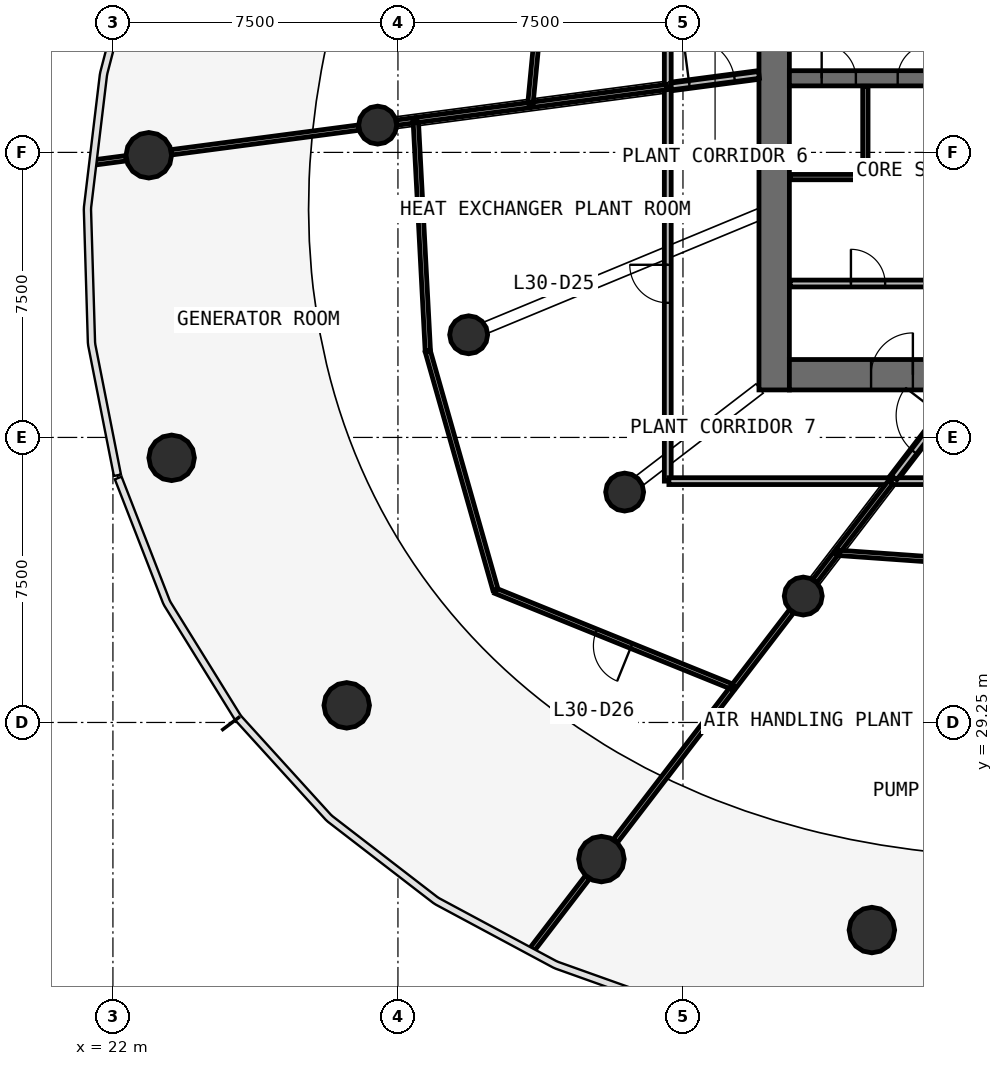
"""IFC4 building model, lengths in metres.
Left out: names, types, materials, properties, quantities, classifications, styles, units other than length and angle.
Written with IfcOpenShell. Run it as: python <this file> out.ifc"""

import sys

from ifc_helpers import new_model, si_unit, direction, frame, frame_2d, origin, origin_2d, place, context, subcontext, project, spatial, rectangle, circle, extrude, source, transform, mapped, element, fill, save


model = new_model("IFC4")
c1 = context("Model", 3, precision=1e-05, world=origin(), true_north=direction((0.0, 1.0)))
c2 = subcontext(c1, "Body", "Model", "MODEL_VIEW")
j1 = project(units=[si_unit("LENGTHUNIT", "METRE"), si_unit("PLANEANGLEUNIT", "RADIAN")], contexts=[c1])
p1 = place(None, origin())
s1 = spatial("IfcSite", under=j1, at=p1, CompositionType="ELEMENT")
p2 = place(p1, origin())
s2 = spatial("IfcBuilding", under=s1, at=p2, CompositionType="ELEMENT")
p3 = place(p2, frame((0.0, 0.0, 129.0)))
s3 = spatial("IfcBuildingStorey", under=s2, at=p3, CompositionType="ELEMENT", Elevation=129.0)
p4 = place(p3, frame((39.4, 58.0, 0.0), z_axis=(0.0, 0.0, 1.0), x_axis=(0.0, -1.0, 0.0)))
e1 = element("IfcWall", 1, at=p4, inside=s3, PredefinedType="SHEAR", context=c2, shape_type="SweptSolid", body=[
    extrude(rectangle(XDim=20.0, YDim=0.8, at=frame_2d((10.0, 0.0))), origin(), (0.0, 0.0, 1.0), 4.1),
])
p5 = place(p4, frame((9.1, 0.0, 0.0)))
e2 = element("IfcOpeningElement", 2, at=p5, cuts=e1, PredefinedType="OPENING", context=c2, shape_type="SweptSolid", body=[
    extrude(rectangle(XDim=1.8, YDim=2.1, at=frame_2d((0.9, 1.05))), frame((0.0, 0.41, 0.0), z_axis=(0.0, -1.0, 0.0), x_axis=(1.0, 0.0, 0.0)), (0.0, 0.0, 1.0), 0.82),
])
p6 = place(p3, frame((39.8, 38.4, 0.0), z_axis=(0.0, 0.0, 1.0), x_axis=(1.0, 0.0, 0.0)))
e3 = element("IfcWall", 3, at=p6, inside=s3, PredefinedType="SHEAR", context=c2, shape_type="SweptSolid", body=[
    extrude(rectangle(XDim=24.4, YDim=0.8, at=frame_2d((12.2, 0.0))), origin(), (0.0, 0.0, 1.0), 4.1),
])
p7 = place(p6, frame((21.65, 0.0, 0.0)))
e4 = element("IfcOpeningElement", 4, at=p7, cuts=e3, PredefinedType="OPENING", context=c2, shape_type="SweptSolid", body=[
    extrude(rectangle(XDim=1.1, YDim=2.1, at=frame_2d((0.55, 1.05))), frame((0.0, 0.41, 0.0), z_axis=(0.0, -1.0, 0.0), x_axis=(1.0, 0.0, 0.0)), (0.0, 0.0, 1.0), 0.82),
])
p8 = place(p6, frame((2.15, 0.0, 0.0)))
e5 = element("IfcOpeningElement", 5, at=p8, cuts=e3, PredefinedType="OPENING", context=c2, shape_type="SweptSolid", body=[
    extrude(rectangle(XDim=1.1, YDim=2.1, at=frame_2d((0.55, 1.05))), frame((0.0, 0.41, 0.0), z_axis=(0.0, -1.0, 0.0), x_axis=(1.0, 0.0, 0.0)), (0.0, 0.0, 1.0), 0.82),
])
p9 = place(p3, frame((39.8, 46.2, 0.0), z_axis=(0.0, 0.0, 1.0), x_axis=(1.0, 0.0, 0.0)))
e6 = element("IfcWall", 6, at=p9, inside=s3, PredefinedType="SHEAR", context=c2, shape_type="SweptSolid", body=[
    extrude(rectangle(XDim=24.4, YDim=0.4, at=frame_2d((12.2, 0.0))), origin(), (0.0, 0.0, 1.0), 4.1),
])
p10 = place(p9, frame((20.65, 0.0, 0.0)))
e7 = element("IfcOpeningElement", 7, at=p10, cuts=e6, PredefinedType="OPENING", context=c2, shape_type="SweptSolid", body=[
    extrude(rectangle(XDim=0.9, YDim=2.1, at=frame_2d((0.45, 1.05))), frame((0.0, 0.21, 0.0), z_axis=(0.0, -1.0, 0.0), x_axis=(1.0, 0.0, 0.0)), (0.0, 0.0, 1.0), 0.42),
])
p11 = place(p9, frame((22.65, 0.0, 0.0)))
e8 = element("IfcOpeningElement", 8, at=p11, cuts=e6, PredefinedType="OPENING", context=c2, shape_type="SweptSolid", body=[
    extrude(rectangle(XDim=0.9, YDim=2.1, at=frame_2d((0.45, 1.05))), frame((0.0, 0.21, 0.0), z_axis=(0.0, -1.0, 0.0), x_axis=(1.0, 0.0, 0.0)), (0.0, 0.0, 1.0), 0.42),
])
p12 = place(p9, frame((0.85, 0.0, 0.0)))
e9 = element("IfcOpeningElement", 9, at=p12, cuts=e6, PredefinedType="OPENING", context=c2, shape_type="SweptSolid", body=[
    extrude(rectangle(XDim=0.9, YDim=2.1, at=frame_2d((0.45, 1.05))), frame((0.0, 0.21, 0.0), z_axis=(0.0, -1.0, 0.0), x_axis=(1.0, 0.0, 0.0)), (0.0, 0.0, 1.0), 0.42),
])
p13 = place(p9, frame((2.85, 0.0, 0.0)))
e10 = element("IfcOpeningElement", 10, at=p13, cuts=e6, PredefinedType="OPENING", context=c2, shape_type="SweptSolid", body=[
    extrude(rectangle(XDim=0.9, YDim=2.1, at=frame_2d((0.45, 1.05))), frame((0.0, 0.21, 0.0), z_axis=(0.0, -1.0, 0.0), x_axis=(1.0, 0.0, 0.0)), (0.0, 0.0, 1.0), 0.42),
])
p14 = place(p9, frame((11.85, 0.0, 0.0)))
e11 = element("IfcOpeningElement", 11, at=p14, cuts=e6, PredefinedType="OPENING", context=c2, shape_type="SweptSolid", body=[
    extrude(rectangle(XDim=0.9, YDim=2.1, at=frame_2d((0.45, 1.05))), frame((0.0, 0.21, 0.0), z_axis=(0.0, -1.0, 0.0), x_axis=(1.0, 0.0, 0.0)), (0.0, 0.0, 1.0), 0.42),
])
m1 = source(origin(), c2, "Body", "SweptSolid", [
    extrude(circle(Radius=0.6, at=origin_2d()), origin(), (0.0, 0.0, 1.0), 3.78),
])
for number, where, z_axis, x_axis in (
    (12, (22.944, 44.175, 0.0), (0.0, 0.0, 1.0), (1.0, 0.0, 0.0)),
    (13, (23.544, 36.213, 0.0), (0.0, 0.0, 1.0), (1.0, 0.0, 0.0)),
    (14, (28.152, 29.701, 0.0), (0.0, 0.0, 1.0), (1.0, 0.0, 0.0)),
    (15, (34.854, 25.655, 0.0), (0.0, 0.0, 1.0), (1.0, 0.0, 0.0)),
    (16, (41.971, 23.788, 0.0), (0.0, 0.0, 1.0), (1.0, 0.0, 0.0)),
):
    element("IfcColumn", number, at=place(p3, frame(where, z_axis=z_axis, x_axis=x_axis)), inside=s3, PredefinedType="COLUMN", context=c2, shape_type="MappedRepresentation", body=[
        mapped(m1, transform((0.0, 0.0, 0.0), scale=1.0)),
    ])
m2 = source(origin(), c2, "Body", "SweptSolid", [
    extrude(circle(Radius=0.5, at=origin_2d()), origin(), (0.0, 0.0, 1.0), 3.78),
])
for number, where, z_axis, x_axis in (
    (17, (28.966, 44.968, 0.0), (0.0, 0.0, 1.0), (1.0, 0.0, 0.0)),
    (18, (31.361, 39.451, 0.0), (0.0, 0.0, 1.0), (1.0, 0.0, 0.0)),
    (19, (35.465, 35.312, 0.0), (0.0, 0.0, 1.0), (1.0, 0.0, 0.0)),
    (20, (40.165, 32.576, 0.0), (0.0, 0.0, 1.0), (1.0, 0.0, 0.0)),
):
    element("IfcColumn", number, at=place(p3, frame(where, z_axis=z_axis, x_axis=x_axis)), inside=s3, PredefinedType="COLUMN", context=c2, shape_type="MappedRepresentation", body=[
        mapped(m2, transform((0.0, 0.0, 0.0), scale=1.0)),
    ])
p15 = place(p3, frame((36.6, 45.973, 0.0), z_axis=(0.0, 0.0, 1.0), x_axis=(0.0, 1.0, 0.0)))
e21 = element("IfcWall", 21, at=p15, inside=s3, PredefinedType="PARTITIONING", context=c2, shape_type="SweptSolid", body=[
    extrude(rectangle(XDim=13.24, YDim=0.18, at=frame_2d((6.62, 0.0))), origin(), (0.0, 0.0, 1.0), 2.58),
])
p16 = place(p15, frame((6.19, 0.0, 0.0)))
e22 = element("IfcOpeningElement", 22, at=p16, cuts=e21, PredefinedType="OPENING", context=c2, shape_type="SweptSolid", body=[
    extrude(rectangle(XDim=1.0, YDim=2.1, at=frame_2d((0.5, 1.05))), frame((0.0, 0.1, 0.0), z_axis=(0.0, -1.0, 0.0), x_axis=(1.0, 0.0, 0.0)), (0.0, 0.0, 1.0), 0.2),
])
p17 = place(p3, frame((53.603, 35.6, 0.0), z_axis=(0.0, 0.0, 1.0), x_axis=(-1.0, 0.0, 0.0)))
e23 = element("IfcWall", 23, at=p17, inside=s3, PredefinedType="PARTITIONING", context=c2, shape_type="SweptSolid", body=[
    extrude(rectangle(XDim=11.117, YDim=0.18, at=frame_2d((5.559, 0.0))), origin(), (0.0, 0.0, 1.0), 2.58),
])
p18 = place(p17, frame((5.067, 0.0, 0.0)))
e24 = element("IfcOpeningElement", 24, at=p18, cuts=e23, PredefinedType="OPENING", context=c2, shape_type="SweptSolid", body=[
    extrude(rectangle(XDim=1.0, YDim=2.1, at=frame_2d((0.5, 1.05))), frame((0.0, 0.1, 0.0), z_axis=(0.0, -1.0, 0.0), x_axis=(1.0, 0.0, 0.0)), (0.0, 0.0, 1.0), 0.2),
])
p19 = place(p3, frame((36.6, 35.6, 0.0), z_axis=(0.0, 0.0, 1.0), x_axis=(0.0, 1.0, 0.0)))
e25 = element("IfcWall", 25, at=p19, inside=s3, PredefinedType="PARTITIONING", context=c2, shape_type="SweptSolid", body=[
    extrude(rectangle(XDim=10.343, YDim=0.18, at=frame_2d((5.171, 0.0))), origin(), (0.0, 0.0, 1.0), 2.58),
])
p20 = place(p19, frame((4.693, 0.0, 0.0)))
e26 = element("IfcOpeningElement", 26, at=p20, cuts=e25, PredefinedType="OPENING", context=c2, shape_type="SweptSolid", body=[
    extrude(rectangle(XDim=1.0, YDim=2.1, at=frame_2d((0.5, 1.05))), frame((0.0, 0.1, 0.0), z_axis=(0.0, -1.0, 0.0), x_axis=(1.0, 0.0, 0.0)), (0.0, 0.0, 1.0), 0.2),
])
p21 = place(p3, frame((36.63, 35.6, 0.0), z_axis=(0.0, 0.0, 1.0), x_axis=(1.0, 0.0, 0.0)))
e27 = element("IfcWall", 27, at=p21, inside=s3, PredefinedType="PARTITIONING", context=c2, shape_type="SweptSolid", body=[
    extrude(rectangle(XDim=5.825, YDim=0.18, at=frame_2d((2.913, 0.0))), origin(), (0.0, 0.0, 1.0), 2.58),
])
p22 = place(p3, frame((39.82, 40.8, 0.0), z_axis=(0.0, 0.0, 1.0), x_axis=(1.0, 0.0, 0.0)))
e28 = element("IfcWall", 28, at=p22, inside=s3, PredefinedType="PARTITIONING", context=c2, shape_type="SweptSolid", body=[
    extrude(rectangle(XDim=3.95, YDim=0.18, at=frame_2d((1.975, 0.0))), origin(), (0.0, 0.0, 1.0), 3.78),
])
p23 = place(p22, frame((1.6, 0.0, 0.0)))
e29 = element("IfcOpeningElement", 29, at=p23, cuts=e28, PredefinedType="OPENING", context=c2, shape_type="SweptSolid", body=[
    extrude(rectangle(XDim=0.9, YDim=2.1, at=frame_2d((0.45, 1.05))), frame((0.0, 0.1, 0.0), z_axis=(0.0, -1.0, 0.0), x_axis=(1.0, 0.0, 0.0)), (0.0, 0.0, 1.0), 0.2),
])
p24 = place(p3, frame((42.554, 35.69, 0.0), z_axis=(0.0, 0.0, 1.0), x_axis=(0.608737787706, 0.793371480341, 0.0)))
e30 = element("IfcWall", 30, at=p24, inside=s3, PredefinedType="PARTITIONING", context=c2, shape_type="SweptSolid", body=[
    extrude(rectangle(XDim=2.912, YDim=0.18, at=frame_2d((1.456, 0.0))), origin(), (0.0, 0.0, 1.0), 2.58),
])
p25 = place(p24, frame((0.862, 0.0, 0.0)))
e31 = element("IfcOpeningElement", 31, at=p25, cuts=e30, PredefinedType="OPENING", context=c2, shape_type="SweptSolid", body=[
    extrude(rectangle(XDim=1.2, YDim=2.1, at=frame_2d((0.6, 1.05))), frame((0.0, 0.1, 0.0), z_axis=(0.0, -1.0, 0.0), x_axis=(1.0, 0.0, 0.0)), (0.0, 0.0, 1.0), 0.2),
])
p26 = place(p3, frame((36.69, 45.984, 0.0), z_axis=(0.0, 0.0, 1.0), x_axis=(0.991440737811, 0.130557509967, 0.0)))
e32 = element("IfcWall", 32, at=p26, inside=s3, PredefinedType="PARTITIONING", context=c2, shape_type="SweptSolid", body=[
    extrude(rectangle(XDim=2.33, YDim=0.18, at=frame_2d((1.165, 0.0))), origin(), (0.0, 0.0, 1.0), 2.58),
])
p27 = place(p26, frame((0.48, 0.0, 0.0)))
e33 = element("IfcOpeningElement", 33, at=p27, cuts=e32, PredefinedType="OPENING", context=c2, shape_type="SweptSolid", body=[
    extrude(rectangle(XDim=1.2, YDim=2.1, at=frame_2d((0.6, 1.05))), frame((0.0, 0.1, 0.0), z_axis=(0.0, -1.0, 0.0), x_axis=(1.0, 0.0, 0.0)), (0.0, 0.0, 1.0), 0.2),
])
p28 = place(p3, frame((38.325, 30.179, 0.0), z_axis=(0.0, 0.0, 1.0), x_axis=(-0.926824754309, 0.375494174122, 0.0)))
e34 = element("IfcWall", 34, at=p28, inside=s3, PredefinedType="PARTITIONING", context=c2, shape_type="SweptSolid", body=[
    extrude(rectangle(XDim=6.744, YDim=0.14, at=frame_2d((3.372, 0.0))), origin(), (0.0, 0.0, 1.0), 2.58),
])
p29 = place(p28, frame((2.894, 0.0, 0.0)))
e35 = element("IfcOpeningElement", 35, at=p29, cuts=e34, PredefinedType="OPENING", context=c2, shape_type="SweptSolid", body=[
    extrude(rectangle(XDim=1.0, YDim=2.1, at=frame_2d((0.5, 1.05))), frame((0.0, 0.08, 0.0), z_axis=(0.0, -1.0, 0.0), x_axis=(1.0, 0.0, 0.0)), (0.0, 0.0, 1.0), 0.16),
])
p30 = place(p3, frame((30.288, 39.006, 0.0), z_axis=(0.0, 0.0, 1.0), x_axis=(0.273146643533, -0.961972406635, 0.0)))
e36 = element("IfcWall", 36, at=p30, inside=s3, PredefinedType="PARTITIONING", context=c2, shape_type="SweptSolid", body=[
    extrude(rectangle(XDim=6.514, YDim=0.14, at=frame_2d((3.257, 0.0))), origin(), (0.0, 0.0, 1.0), 2.58),
])
p31 = place(p3, frame((29.968, 45.099, 0.0), z_axis=(0.0, 0.0, 1.0), x_axis=(0.052356216137, -0.998628472772, 0.0)))
e37 = element("IfcWall", 37, at=p31, inside=s3, PredefinedType="PARTITIONING", context=c2, shape_type="SweptSolid", body=[
    extrude(rectangle(XDim=6.071, YDim=0.14, at=frame_2d((3.036, 0.0))), origin(), (0.0, 0.0, 1.0), 2.58),
])
p32 = place(p3, frame((38.281, 30.121, 0.0), z_axis=(0.0, 0.0, 1.0), x_axis=(-0.60874767724, -0.793363892205, 0.0)))
e38 = element("IfcWall", 38, at=p32, inside=s3, PredefinedType="PARTITIONING", context=c2, shape_type="SweptSolid", body=[
    extrude(rectangle(XDim=5.025, YDim=0.14, at=frame_2d((2.513, 0.0))), origin(), (0.0, 0.0, 1.0), 2.58),
])
p33 = place(p3, frame((33.458, 50.441, 0.0), z_axis=(0.0, 0.0, 1.0), x_axis=(-0.095688058523, -0.995411369965, 0.0)))
e39 = element("IfcWall", 39, at=p33, inside=s3, PredefinedType="PARTITIONING", context=c2, shape_type="SweptSolid", body=[
    extrude(rectangle(XDim=4.968, YDim=0.14, at=frame_2d((2.484, 0.0))), origin(), (0.0, 0.0, 1.0), 2.58),
])
p34 = place(p3, frame((28.466, 44.902, 0.0), z_axis=(0.0, 0.0, 1.0), x_axis=(-0.991443414541, -0.130537181533, 0.0)))
e40 = element("IfcWall", 40, at=p34, inside=s3, PredefinedType="PARTITIONING", context=c2, shape_type="SweptSolid", body=[
    extrude(rectangle(XDim=4.966, YDim=0.14, at=frame_2d((2.483, 0.0))), origin(), (0.0, 0.0, 1.0), 2.58),
])
p35 = place(p3, frame((41.04, 33.717, 0.0), z_axis=(0.0, 0.0, 1.0), x_axis=(0.997502909213, -0.070625392825, 0.0)))
e41 = element("IfcWall", 41, at=p35, inside=s3, PredefinedType="PARTITIONING", context=c2, shape_type="SweptSolid", body=[
    extrude(rectangle(XDim=4.912, YDim=0.14, at=frame_2d((2.456, 0.0))), origin(), (0.0, 0.0, 1.0), 2.58),
])
p36 = place(p3, frame((36.57, 45.969, 0.0), z_axis=(0.0, 0.0, 1.0), x_axis=(-0.991447734454, -0.130504367157, 0.0)))
e42 = element("IfcWall", 42, at=p36, inside=s3, PredefinedType="PARTITIONING", context=c2, shape_type="SweptSolid", body=[
    extrude(rectangle(XDim=3.547, YDim=0.14, at=frame_2d((1.773, 0.0))), origin(), (0.0, 0.0, 1.0), 2.58),
])
p37 = place(p3, frame((32.953, 45.492, 0.0), z_axis=(0.0, 0.0, 1.0), x_axis=(-0.991441188221, -0.130554089552, 0.0)))
e43 = element("IfcWall", 43, at=p37, inside=s3, PredefinedType="PARTITIONING", context=c2, shape_type="SweptSolid", body=[
    extrude(rectangle(XDim=2.981, YDim=0.14, at=frame_2d((1.49, 0.0))), origin(), (0.0, 0.0, 1.0), 2.58),
])
p38 = place(p3, frame((39.858, 32.176, 0.0), z_axis=(0.0, 0.0, 1.0), x_axis=(-0.608804420468, -0.793320349934, 0.0)))
e44 = element("IfcWall", 44, at=p38, inside=s3, PredefinedType="PARTITIONING", context=c2, shape_type="SweptSolid", body=[
    extrude(rectangle(XDim=2.488, YDim=0.14, at=frame_2d((1.244, 0.0))), origin(), (0.0, 0.0, 1.0), 2.58),
])
p39 = place(p3, frame((34.486, 25.176, 0.0), z_axis=(0.0, 0.0, 1.0), x_axis=(-0.608723111947, -0.793382740537, 0.0)))
e45 = element("IfcWall", 45, at=p39, inside=s3, PredefinedType="PARTITIONING", context=c2, shape_type="SweptSolid", body=[
    extrude(rectangle(XDim=2.39, YDim=0.14, at=frame_2d((1.195, 0.0))), origin(), (0.0, 0.0, 1.0), 2.98),
])
p40 = place(p3, frame((41.8, 43.6, 0.0), z_axis=(0.0, 0.0, 1.0), x_axis=(0.0, 1.0, 0.0)))
e46 = element("IfcWall", 46, at=p40, inside=s3, PredefinedType="PARTITIONING", context=c2, shape_type="SweptSolid", body=[
    extrude(rectangle(XDim=2.39, YDim=0.14, at=frame_2d((1.195, 0.0))), origin(), (0.0, 0.0, 1.0), 2.98),
])
p41 = place(p3, frame((42.463, 35.571, 0.0), z_axis=(0.0, 0.0, 1.0), x_axis=(-0.608788650818, -0.79333245152, 0.0)))
e47 = element("IfcWall", 47, at=p41, inside=s3, PredefinedType="PARTITIONING", context=c2, shape_type="SweptSolid", body=[
    extrude(rectangle(XDim=2.253, YDim=0.14, at=frame_2d((1.126, 0.0))), origin(), (0.0, 0.0, 1.0), 2.58),
])
p42 = place(p3, frame((43.77, 43.6, 0.0), z_axis=(0.0, 0.0, 1.0), x_axis=(-1.0, 0.0, 0.0)))
e48 = element("IfcWall", 48, at=p42, inside=s3, PredefinedType="PARTITIONING", context=c2, shape_type="SweptSolid", body=[
    extrude(rectangle(XDim=1.94, YDim=0.14, at=frame_2d((0.97, 0.0))), origin(), (0.0, 0.0, 1.0), 2.98),
])
p43 = place(p3, frame((41.77, 43.6, 0.0), z_axis=(0.0, 0.0, 1.0), x_axis=(-1.0, 0.0, 0.0)))
e49 = element("IfcWall", 49, at=p43, inside=s3, PredefinedType="PARTITIONING", context=c2, shape_type="SweptSolid", body=[
    extrude(rectangle(XDim=1.95, YDim=0.14, at=frame_2d((0.975, 0.0))), origin(), (0.0, 0.0, 1.0), 2.98),
])
p44 = place(p3, frame((41.022, 33.693, 0.0), z_axis=(0.0, 0.0, 1.0), x_axis=(-0.608783191851, -0.793336640601, 0.0)))
e50 = element("IfcWall", 50, at=p44, inside=s3, PredefinedType="PARTITIONING", context=c2, shape_type="SweptSolid", body=[
    extrude(rectangle(XDim=0.904, YDim=0.14, at=frame_2d((0.452, 0.0))), origin(), (0.0, 0.0, 1.0), 2.58),
])
p45 = place(p3, frame((22.344, 44.096, 0.0), z_axis=(0.0, 0.0, 1.0), x_axis=(-0.991436143334, -0.130592395224, 0.0)))
e51 = element("IfcWall", 51, at=p45, inside=s3, PredefinedType="PARTITIONING", context=c2, shape_type="SweptSolid", body=[
    extrude(rectangle(XDim=0.824, YDim=0.14, at=frame_2d((0.412, 0.0))), origin(), (0.0, 0.0, 1.0), 2.98),
])
p46 = place(p3, frame((29.898, 45.09, 0.0), z_axis=(0.0, 0.0, 1.0), x_axis=(-0.991509530601, -0.1300340368, 0.0)))
e52 = element("IfcWall", 52, at=p46, inside=s3, PredefinedType="PARTITIONING", context=c2, shape_type="SweptSolid", body=[
    extrude(rectangle(XDim=0.436, YDim=0.14, at=frame_2d((0.218, 0.0))), origin(), (0.0, 0.0, 1.0), 2.58),
])
m3 = source(origin(), c2, "Body", "SweptSolid", [
    extrude(rectangle(XDim=1.1, YDim=2.1, at=frame_2d((0.55, 1.05))), frame((0.0, 0.025, 0.0), z_axis=(0.0, -1.0, 0.0), x_axis=(1.0, 0.0, 0.0)), (0.0, 0.0, 1.0), 0.05),
])
p47 = place(p8, origin())
e53 = element("IfcDoor", 53, at=p47, inside=s3, OperationType="SINGLE_SWING_RIGHT", PredefinedType="DOOR", context=c2, shape_type="MappedRepresentation", body=[
    mapped(m3, transform((0.0, 0.0, 0.0), scale=1.0)),
])
fill(e5, e53)
m4 = source(origin(), c2, "Body", "SweptSolid", [
    extrude(rectangle(XDim=1.0, YDim=2.1, at=frame_2d((0.5, 1.05))), frame((0.0, 0.025, 0.0), z_axis=(0.0, -1.0, 0.0), x_axis=(1.0, 0.0, 0.0)), (0.0, 0.0, 1.0), 0.05),
])
p48 = place(p20, origin())
e54 = element("IfcDoor", 54, at=p48, inside=s3, OperationType="SINGLE_SWING_RIGHT", PredefinedType="DOOR", context=c2, shape_type="MappedRepresentation", body=[
    mapped(m4, transform((0.0, 0.0, 0.0), scale=1.0)),
])
fill(e26, e54)
p49 = place(p29, origin())
e55 = element("IfcDoor", 55, at=p49, inside=s3, OperationType="SINGLE_SWING_LEFT", PredefinedType="DOOR", context=c2, shape_type="MappedRepresentation", body=[
    mapped(m4, transform((0.0, 0.0, 0.0), scale=1.0)),
])
fill(e35, e55)
m5 = source(origin(), c2, "Body", "SweptSolid", [
    extrude(rectangle(XDim=1.2, YDim=2.1, at=frame_2d((0.6, 1.05))), frame((0.0, 0.025, 0.0), z_axis=(0.0, -1.0, 0.0), x_axis=(1.0, 0.0, 0.0)), (0.0, 0.0, 1.0), 0.05),
])
p50 = place(p27, origin())
e56 = element("IfcDoor", 56, at=p50, inside=s3, OperationType="SINGLE_SWING_LEFT", PredefinedType="DOOR", context=c2, shape_type="MappedRepresentation", body=[
    mapped(m5, transform((0.0, 0.0, 0.0), scale=1.0)),
])
fill(e33, e56)
p51 = place(p25, origin())
e57 = element("IfcDoor", 57, at=p51, inside=s3, OperationType="SINGLE_SWING_RIGHT", PredefinedType="DOOR", context=c2, shape_type="MappedRepresentation", body=[
    mapped(m5, transform((0.0, 0.0, 0.0), scale=1.0)),
])
fill(e31, e57)
m6 = source(origin(), c2, "Body", "SweptSolid", [
    extrude(rectangle(XDim=0.9, YDim=2.1, at=frame_2d((0.45, 1.05))), frame((0.0, 0.025, 0.0), z_axis=(0.0, -1.0, 0.0), x_axis=(1.0, 0.0, 0.0)), (0.0, 0.0, 1.0), 0.05),
])
p52 = place(p23, origin())
e58 = element("IfcDoor", 58, at=p52, inside=s3, OperationType="SINGLE_SWING_LEFT", PredefinedType="DOOR", context=c2, shape_type="MappedRepresentation", body=[
    mapped(m6, transform((0.0, 0.0, 0.0), scale=1.0)),
])
fill(e29, e58)
p53 = place(p12, origin())
e59 = element("IfcDoor", 59, at=p53, inside=s3, OperationType="SINGLE_SWING_LEFT", PredefinedType="DOOR", context=c2, shape_type="MappedRepresentation", body=[
    mapped(m6, transform((0.0, 0.0, 0.0), scale=1.0)),
])
fill(e9, e59)
p54 = place(p13, origin())
e60 = element("IfcDoor", 60, at=p54, inside=s3, OperationType="SINGLE_SWING_RIGHT", PredefinedType="DOOR", context=c2, shape_type="MappedRepresentation", body=[
    mapped(m6, transform((0.0, 0.0, 0.0), scale=1.0)),
])
fill(e10, e60)
save(model, sys.argv[1])
